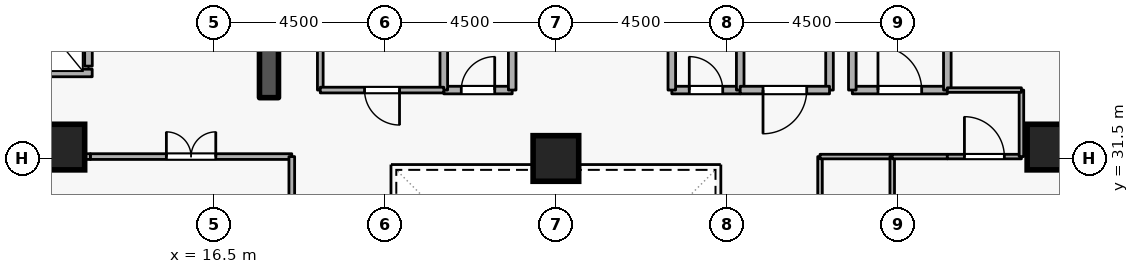
"""IFC4 building model, lengths in metres.
Left out: names, types, materials, properties, quantities, classifications, styles, units other than length and angle.
Written with IfcOpenShell. Run it as: python <this file> out.ifc"""

import sys

from ifc_helpers import new_model, si_unit, direction, frame, frame_2d, origin, origin_2d, place, context, subcontext, project, spatial, rectangle, extrude, element, fill, save


model = new_model("IFC4")
c1 = context("Model", 3, precision=1e-05, world=origin(), true_north=direction((0.0, 1.0)))
c2 = subcontext(c1, "Body", "Model", "MODEL_VIEW")
j1 = project(units=[si_unit("LENGTHUNIT", "METRE"), si_unit("PLANEANGLEUNIT", "RADIAN")], contexts=[c1])
p1 = place(None, origin())
s1 = spatial("IfcSite", under=j1, at=p1, CompositionType="ELEMENT")
p2 = place(p1, origin())
s2 = spatial("IfcBuilding", under=s1, at=p2, CompositionType="ELEMENT")
p3 = place(p2, frame((0.0, 0.0, 137.7)))
s3 = spatial("IfcBuildingStorey", under=s2, at=p3, CompositionType="ELEMENT", Elevation=137.7)
p4 = place(p3, frame((17.95, 33.1, 0.0), z_axis=(0.0, 0.0, 1.0), x_axis=(0.0, 1.0, 0.0)))
e1 = element("IfcWall", 1, at=p4, inside=s3, PredefinedType="SHEAR", context=c2, shape_type="SweptSolid", body=[
    extrude(rectangle(XDim=5.8, YDim=0.5, at=frame_2d((2.9, 0.0))), origin(), (0.0, 0.0, 1.0), 3.6),
])
for number, where, z_axis, x_axis in (
    (2, (12.5, 31.8, 0.0), (0.0, 0.0, 1.0), (1.0, 0.0, 0.0)),
    (3, (38.5, 31.8, 0.0), (0.0, 0.0, 1.0), (1.0, 0.0, 0.0)),
    (4, (25.5, 31.5, 0.0), (0.0, 0.0, 1.0), (1.0, 0.0, 0.0)),
):
    element("IfcColumn", number, at=place(p3, frame(where, z_axis=z_axis, x_axis=x_axis)), inside=s3, PredefinedType="COLUMN", context=c2, shape_type="SweptSolid", body=[
        extrude(rectangle(XDim=1.2, YDim=1.2, at=origin_2d()), origin(), (0.0, 0.0, 1.0), 3.6),
    ])
p5 = place(p3, frame((13.2, 33.93, 0.0), z_axis=(0.0, 0.0, 1.0), x_axis=(0.0, 1.0, 0.0)))
e5 = element("IfcWall", 5, at=p5, inside=s3, PredefinedType="STANDARD", context=c2, shape_type="SweptSolid", body=[
    extrude(rectangle(XDim=1.94, YDim=0.2, at=frame_2d((0.97, 0.0))), origin(), (0.0, 0.0, 1.0), 3.26),
])
p6 = place(p5, frame((0.46, 0.0, 0.0)))
e6 = element("IfcOpeningElement", 6, at=p6, cuts=e5, PredefinedType="OPENING", context=c2, shape_type="SweptSolid", body=[
    extrude(rectangle(XDim=1.02, YDim=2.06, at=frame_2d((0.51, 1.03))), frame((0.0, 0.11, 0.0), z_axis=(0.0, -1.0, 0.0), x_axis=(1.0, 0.0, 0.0)), (0.0, 0.0, 1.0), 0.22),
])
p7 = place(p3, frame((11.002, 33.75, 0.0), z_axis=(0.0, 0.0, 1.0), x_axis=(1.0, 0.0, 0.0)))
e7 = element("IfcWall", 7, at=p7, inside=s3, PredefinedType="STANDARD", context=c2, shape_type="SweptSolid", body=[
    extrude(rectangle(XDim=2.296, YDim=0.2, at=frame_2d((1.148, 0.0))), origin(), (0.0, 0.0, 1.0), 3.26),
])
p8 = place(p3, frame((33.3, 33.3, 0.0), z_axis=(0.0, 0.0, 1.0), x_axis=(1.0, 0.0, 0.0)))
e8 = element("IfcWall", 8, at=p8, inside=s3, PredefinedType="STANDARD", context=c2, shape_type="SweptSolid", body=[
    extrude(rectangle(XDim=2.5, YDim=0.2, at=frame_2d((1.25, 0.0))), origin(), (0.0, 0.0, 1.0), 3.26),
])
p9 = place(p8, frame((0.675, 0.0, 0.0)))
e9 = element("IfcOpeningElement", 9, at=p9, cuts=e8, PredefinedType="OPENING", context=c2, shape_type="SweptSolid", body=[
    extrude(rectangle(XDim=1.15, YDim=2.1, at=frame_2d((0.575, 1.05))), frame((0.0, 0.11, 0.0), z_axis=(0.0, -1.0, 0.0), x_axis=(1.0, 0.0, 0.0)), (0.0, 0.0, 1.0), 0.22),
])
p10 = place(p3, frame((35.8, 33.3, 0.0), z_axis=(0.0, 0.0, 1.0), x_axis=(0.0, 1.0, 0.0)))
e10 = element("IfcWall", 10, at=p10, inside=s3, PredefinedType="STANDARD", context=c2, shape_type="SweptSolid", body=[
    extrude(rectangle(XDim=5.7, YDim=0.2, at=frame_2d((2.85, 0.0))), origin(), (0.0, 0.0, 1.0), 3.26),
])
p11 = place(p3, frame((33.3, 35.6, 0.0), z_axis=(0.0, 0.0, 1.0), x_axis=(0.0, -1.0, 0.0)))
e11 = element("IfcWall", 11, at=p11, inside=s3, PredefinedType="STANDARD", context=c2, shape_type="SweptSolid", body=[
    extrude(rectangle(XDim=2.3, YDim=0.2, at=frame_2d((1.15, 0.0))), origin(), (0.0, 0.0, 1.0), 2.465),
])
p12 = place(p3, frame((22.55, 33.3, 0.0), z_axis=(0.0, 0.0, 1.0), x_axis=(1.0, 0.0, 0.0)))
e12 = element("IfcWall", 12, at=p12, inside=s3, PredefinedType="STANDARD", context=c2, shape_type="SweptSolid", body=[
    extrude(rectangle(XDim=1.8, YDim=0.2, at=frame_2d((0.9, 0.0))), origin(), (0.0, 0.0, 1.0), 3.26),
])
p13 = place(p12, frame((0.46, 0.0, 0.0)))
e13 = element("IfcOpeningElement", 13, at=p13, cuts=e12, PredefinedType="OPENING", context=c2, shape_type="SweptSolid", body=[
    extrude(rectangle(XDim=0.88, YDim=2.04, at=frame_2d((0.44, 1.02))), frame((0.0, 0.11, 0.0), z_axis=(0.0, -1.0, 0.0), x_axis=(1.0, 0.0, 0.0)), (0.0, 0.0, 1.0), 0.22),
])
for number, where, z_axis, x_axis in (
    (14, (24.35, 33.3, 0.0), (0.0, 0.0, 1.0), (0.0, 1.0, 0.0)),
    (15, (22.55, 35.35, 0.0), (0.0, 0.0, 1.0), (0.0, -1.0, 0.0)),
):
    element("IfcWall", number, at=place(p3, frame(where, z_axis=z_axis, x_axis=x_axis)), inside=s3, PredefinedType="STANDARD", context=c2, shape_type="SweptSolid", body=[
        extrude(rectangle(XDim=2.05, YDim=0.2, at=frame_2d((1.025, 0.0))), origin(), (0.0, 0.0, 1.0), 3.26),
    ])
p14 = place(p3, frame((28.55, 33.3, 0.0), z_axis=(0.0, 0.0, 1.0), x_axis=(1.0, 0.0, 0.0)))
e16 = element("IfcWall", 16, at=p14, inside=s3, PredefinedType="STANDARD", context=c2, shape_type="SweptSolid", body=[
    extrude(rectangle(XDim=1.8, YDim=0.2, at=frame_2d((0.9, 0.0))), origin(), (0.0, 0.0, 1.0), 3.26),
])
p15 = place(p14, frame((0.46, 0.0, 0.0)))
e17 = element("IfcOpeningElement", 17, at=p15, cuts=e16, PredefinedType="OPENING", context=c2, shape_type="SweptSolid", body=[
    extrude(rectangle(XDim=0.88, YDim=2.04, at=frame_2d((0.44, 1.02))), frame((0.0, 0.11, 0.0), z_axis=(0.0, -1.0, 0.0), x_axis=(1.0, 0.0, 0.0)), (0.0, 0.0, 1.0), 0.22),
])
for number, where, z_axis, x_axis in (
    (18, (30.35, 33.3, 0.0), (0.0, 0.0, 1.0), (0.0, 1.0, 0.0)),
    (19, (28.55, 35.35, 0.0), (0.0, 0.0, 1.0), (0.0, -1.0, 0.0)),
):
    element("IfcWall", number, at=place(p3, frame(where, z_axis=z_axis, x_axis=x_axis)), inside=s3, PredefinedType="STANDARD", context=c2, shape_type="SweptSolid", body=[
        extrude(rectangle(XDim=2.05, YDim=0.2, at=frame_2d((1.025, 0.0))), origin(), (0.0, 0.0, 1.0), 3.26),
    ])
p16 = place(p3, frame((32.7, 35.35, 0.0), z_axis=(0.0, 0.0, 1.0), x_axis=(0.0, -1.0, 0.0)))
e20 = element("IfcWall", 20, at=p16, inside=s3, PredefinedType="STANDARD", context=c2, shape_type="SweptSolid", body=[
    extrude(rectangle(XDim=2.05, YDim=0.2, at=frame_2d((1.025, 0.0))), origin(), (0.0, 0.0, 1.0), 2.465),
])
p17 = place(p3, frame((32.7, 33.3, 0.0), z_axis=(0.0, 0.0, 1.0), x_axis=(-1.0, 0.0, 0.0)))
e21 = element("IfcWall", 21, at=p17, inside=s3, PredefinedType="STANDARD", context=c2, shape_type="SweptSolid", body=[
    extrude(rectangle(XDim=2.35, YDim=0.2, at=frame_2d((1.175, 0.0))), origin(), (0.0, 0.0, 1.0), 3.26),
])
p18 = place(p17, frame((0.6, 0.0, 0.0)))
e22 = element("IfcOpeningElement", 22, at=p18, cuts=e21, PredefinedType="OPENING", context=c2, shape_type="SweptSolid", body=[
    extrude(rectangle(XDim=1.15, YDim=2.1, at=frame_2d((0.575, 1.05))), frame((0.0, 0.11, 0.0), z_axis=(0.0, -1.0, 0.0), x_axis=(1.0, 0.0, 0.0)), (0.0, 0.0, 1.0), 0.22),
])
p19 = place(p3, frame((19.3, 33.3, 0.0), z_axis=(0.0, 0.0, 1.0), x_axis=(0.0, 1.0, 0.0)))
e23 = element("IfcWall", 23, at=p19, inside=s3, PredefinedType="PARTITIONING", context=c2, shape_type="SweptSolid", body=[
    extrude(rectangle(XDim=2.05, YDim=0.15, at=frame_2d((1.025, 0.0))), origin(), (0.0, 0.0, 1.0), 3.26),
])
p20 = place(p3, frame((22.55, 33.3, 0.0), z_axis=(0.0, 0.0, 1.0), x_axis=(-1.0, 0.0, 0.0)))
e24 = element("IfcWall", 24, at=p20, inside=s3, PredefinedType="PARTITIONING", context=c2, shape_type="SweptSolid", body=[
    extrude(rectangle(XDim=3.25, YDim=0.15, at=frame_2d((1.625, 0.0))), origin(), (0.0, 0.0, 1.0), 3.26),
])
p21 = place(p20, frame((1.165, 0.0, 0.0)))
e25 = element("IfcOpeningElement", 25, at=p21, cuts=e24, PredefinedType="OPENING", context=c2, shape_type="SweptSolid", body=[
    extrude(rectangle(XDim=0.92, YDim=2.08, at=frame_2d((0.46, 1.04))), frame((0.0, 0.085, 0.0), z_axis=(0.0, -1.0, 0.0), x_axis=(1.0, 0.0, 0.0)), (0.0, 0.0, 1.0), 0.17),
])
p22 = place(p3, frame((13.25, 31.55, 0.0), z_axis=(0.0, 0.0, 1.0), x_axis=(1.0, 0.0, 0.0)))
e26 = element("IfcWall", 26, at=p22, inside=s3, PredefinedType="PARTITIONING", context=c2, shape_type="SweptSolid", body=[
    extrude(rectangle(XDim=5.3, YDim=0.15, at=frame_2d((2.65, 0.0))), origin(), (0.0, 0.0, 1.0), 3.26),
])
p23 = place(p22, frame((2.0, 0.0, 0.0)))
e27 = element("IfcOpeningElement", 27, at=p23, cuts=e26, PredefinedType="OPENING", context=c2, shape_type="SweptSolid", body=[
    extrude(rectangle(XDim=1.3, YDim=2.12, at=frame_2d((0.65, 1.06))), frame((0.0, 0.085, 0.0), z_axis=(0.0, -1.0, 0.0), x_axis=(1.0, 0.0, 0.0)), (0.0, 0.0, 1.0), 0.17),
])
p24 = place(p3, frame((18.55, 31.55, 0.0), z_axis=(0.0, 0.0, 1.0), x_axis=(0.0, -1.0, 0.0)))
e28 = element("IfcWall", 28, at=p24, inside=s3, PredefinedType="PARTITIONING", context=c2, shape_type="SweptSolid", body=[
    extrude(rectangle(XDim=2.25, YDim=0.15, at=frame_2d((1.125, 0.0))), origin(), (0.0, 0.0, 1.0), 3.26),
])
p25 = place(p3, frame((10.9, 31.55, 0.0), z_axis=(0.0, 0.0, 1.0), x_axis=(1.0, 0.0, 0.0)))
e29 = element("IfcWall", 29, at=p25, inside=s3, PredefinedType="PARTITIONING", context=c2, shape_type="SweptSolid", body=[
    extrude(rectangle(XDim=2.35, YDim=0.15, at=frame_2d((1.175, 0.0))), origin(), (0.0, 0.0, 1.0), 3.26),
])
p26 = place(p3, frame((32.45, 27.0, 0.0), z_axis=(0.0, 0.0, 1.0), x_axis=(0.0, 1.0, 0.0)))
e30 = element("IfcWall", 30, at=p26, inside=s3, PredefinedType="PARTITIONING", context=c2, shape_type="SweptSolid", body=[
    extrude(rectangle(XDim=4.55, YDim=0.12, at=frame_2d((2.275, 0.0))), origin(), (0.0, 0.0, 1.0), 3.26),
])
p27 = place(p26, frame((1.8, 0.0, 0.0)))
e31 = element("IfcOpeningElement", 31, at=p27, cuts=e30, PredefinedType="OPENING", context=c2, shape_type="SweptSolid", body=[
    extrude(rectangle(XDim=0.95, YDim=2.1, at=frame_2d((0.475, 1.05))), frame((0.0, 0.07, 0.0), z_axis=(0.0, -1.0, 0.0), x_axis=(1.0, 0.0, 0.0)), (0.0, 0.0, 1.0), 0.14),
])
p28 = place(p3, frame((32.45, 31.55, 0.0), z_axis=(0.0, 0.0, 1.0), x_axis=(1.0, 0.0, 0.0)))
e32 = element("IfcWall", 32, at=p28, inside=s3, PredefinedType="PARTITIONING", context=c2, shape_type="SweptSolid", body=[
    extrude(rectangle(XDim=1.9, YDim=0.12, at=frame_2d((0.95, 0.0))), origin(), (0.0, 0.0, 1.0), 3.26),
])
p29 = place(p3, frame((34.35, 31.55, 0.0), z_axis=(0.0, 0.0, 1.0), x_axis=(0.0, -1.0, 0.0)))
e33 = element("IfcWall", 33, at=p29, inside=s3, PredefinedType="PARTITIONING", context=c2, shape_type="SweptSolid", body=[
    extrude(rectangle(XDim=4.55, YDim=0.12, at=frame_2d((2.275, 0.0))), origin(), (0.0, 0.0, 1.0), 3.26),
])
p30 = place(p3, frame((34.35, 31.55, 0.0), z_axis=(0.0, 0.0, 1.0), x_axis=(1.0, 0.0, 0.0)))
e34 = element("IfcWall", 34, at=p30, inside=s3, PredefinedType="PARTITIONING", context=c2, shape_type="SweptSolid", body=[
    extrude(rectangle(XDim=1.45, YDim=0.12, at=frame_2d((0.725, 0.0))), origin(), (0.0, 0.0, 1.0), 3.26),
])
p31 = place(p3, frame((35.8, 31.55, 0.0), z_axis=(0.0, 0.0, 1.0), x_axis=(1.0, 0.0, 0.0)))
e35 = element("IfcWall", 35, at=p31, inside=s3, PredefinedType="PARTITIONING", context=c2, shape_type="SweptSolid", body=[
    extrude(rectangle(XDim=1.95, YDim=0.12, at=frame_2d((0.975, 0.0))), origin(), (0.0, 0.0, 1.0), 3.26),
])
p32 = place(p31, frame((0.45, 0.0, 0.0)))
e36 = element("IfcOpeningElement", 36, at=p32, cuts=e35, PredefinedType="OPENING", context=c2, shape_type="SweptSolid", body=[
    extrude(rectangle(XDim=1.05, YDim=2.1, at=frame_2d((0.525, 1.05))), frame((0.0, 0.07, 0.0), z_axis=(0.0, -1.0, 0.0), x_axis=(1.0, 0.0, 0.0)), (0.0, 0.0, 1.0), 0.14),
])
p33 = place(p3, frame((37.75, 31.55, 0.0), z_axis=(0.0, 0.0, 1.0), x_axis=(0.0, 1.0, 0.0)))
e37 = element("IfcWall", 37, at=p33, inside=s3, PredefinedType="PARTITIONING", context=c2, shape_type="SweptSolid", body=[
    extrude(rectangle(XDim=1.75, YDim=0.12, at=frame_2d((0.875, 0.0))), origin(), (0.0, 0.0, 1.0), 3.26),
])
p34 = place(p3, frame((37.75, 33.3, 0.0), z_axis=(0.0, 0.0, 1.0), x_axis=(-1.0, 0.0, 0.0)))
e38 = element("IfcWall", 38, at=p34, inside=s3, PredefinedType="PARTITIONING", context=c2, shape_type="SweptSolid", body=[
    extrude(rectangle(XDim=1.95, YDim=0.12, at=frame_2d((0.975, 0.0))), origin(), (0.0, 0.0, 1.0), 3.26),
])
p35 = place(p9, origin())
e39 = element("IfcDoor", 39, at=p35, inside=s3, OperationType="SINGLE_SWING_LEFT", PredefinedType="DOOR", context=c2, shape_type="SweptSolid", body=[
    extrude(rectangle(XDim=1.15, YDim=2.1, at=frame_2d((0.575, 1.05))), frame((0.0, 0.025, 0.0), z_axis=(0.0, -1.0, 0.0), x_axis=(1.0, 0.0, 0.0)), (0.0, 0.0, 1.0), 0.05),
])
fill(e9, e39)
p36 = place(p13, origin())
e40 = element("IfcDoor", 40, at=p36, inside=s3, OperationType="SINGLE_SWING_RIGHT", PredefinedType="DOOR", context=c2, shape_type="SweptSolid", body=[
    extrude(rectangle(XDim=0.88, YDim=2.04, at=frame_2d((0.44, 1.02))), frame((0.0, 0.025, 0.0), z_axis=(0.0, -1.0, 0.0), x_axis=(1.0, 0.0, 0.0)), (0.0, 0.0, 1.0), 0.05),
])
fill(e13, e40)
p37 = place(p15, origin())
e41 = element("IfcDoor", 41, at=p37, inside=s3, OperationType="SINGLE_SWING_LEFT", PredefinedType="DOOR", context=c2, shape_type="SweptSolid", body=[
    extrude(rectangle(XDim=0.88, YDim=2.04, at=frame_2d((0.44, 1.02))), frame((0.0, 0.025, 0.0), z_axis=(0.0, -1.0, 0.0), x_axis=(1.0, 0.0, 0.0)), (0.0, 0.0, 1.0), 0.05),
])
fill(e17, e41)
p38 = place(p21, origin())
e42 = element("IfcDoor", 42, at=p38, inside=s3, OperationType="SINGLE_SWING_LEFT", PredefinedType="DOOR", context=c2, shape_type="SweptSolid", body=[
    extrude(rectangle(XDim=0.92, YDim=2.08, at=frame_2d((0.46, 1.04))), frame((0.0, 0.025, 0.0), z_axis=(0.0, -1.0, 0.0), x_axis=(1.0, 0.0, 0.0)), (0.0, 0.0, 1.0), 0.05),
])
fill(e25, e42)
p39 = place(p18, origin())
e43 = element("IfcDoor", 43, at=p39, inside=s3, OperationType="SINGLE_SWING_RIGHT", PredefinedType="DOOR", context=c2, shape_type="SweptSolid", body=[
    extrude(rectangle(XDim=1.15, YDim=2.1, at=frame_2d((0.575, 1.05))), frame((0.0, 0.025, 0.0), z_axis=(0.0, -1.0, 0.0), x_axis=(1.0, 0.0, 0.0)), (0.0, 0.0, 1.0), 0.05),
])
fill(e22, e43)
p40 = place(p23, origin())
e44 = element("IfcDoor", 44, at=p40, inside=s3, OperationType="DOUBLE_DOOR_SINGLE_SWING", PredefinedType="DOOR", context=c2, shape_type="SweptSolid", body=[
    extrude(rectangle(XDim=1.3, YDim=2.12, at=frame_2d((0.65, 1.06))), frame((0.0, 0.025, 0.0), z_axis=(0.0, -1.0, 0.0), x_axis=(1.0, 0.0, 0.0)), (0.0, 0.0, 1.0), 0.05),
])
fill(e27, e44)
p41 = place(p32, origin())
e45 = element("IfcDoor", 45, at=p41, inside=s3, OperationType="SINGLE_SWING_LEFT", PredefinedType="DOOR", context=c2, shape_type="SweptSolid", body=[
    extrude(rectangle(XDim=1.05, YDim=2.1, at=frame_2d((0.525, 1.05))), frame((0.0, 0.025, 0.0), z_axis=(0.0, -1.0, 0.0), x_axis=(1.0, 0.0, 0.0)), (0.0, 0.0, 1.0), 0.05),
])
fill(e36, e45)
save(model, sys.argv[1])
